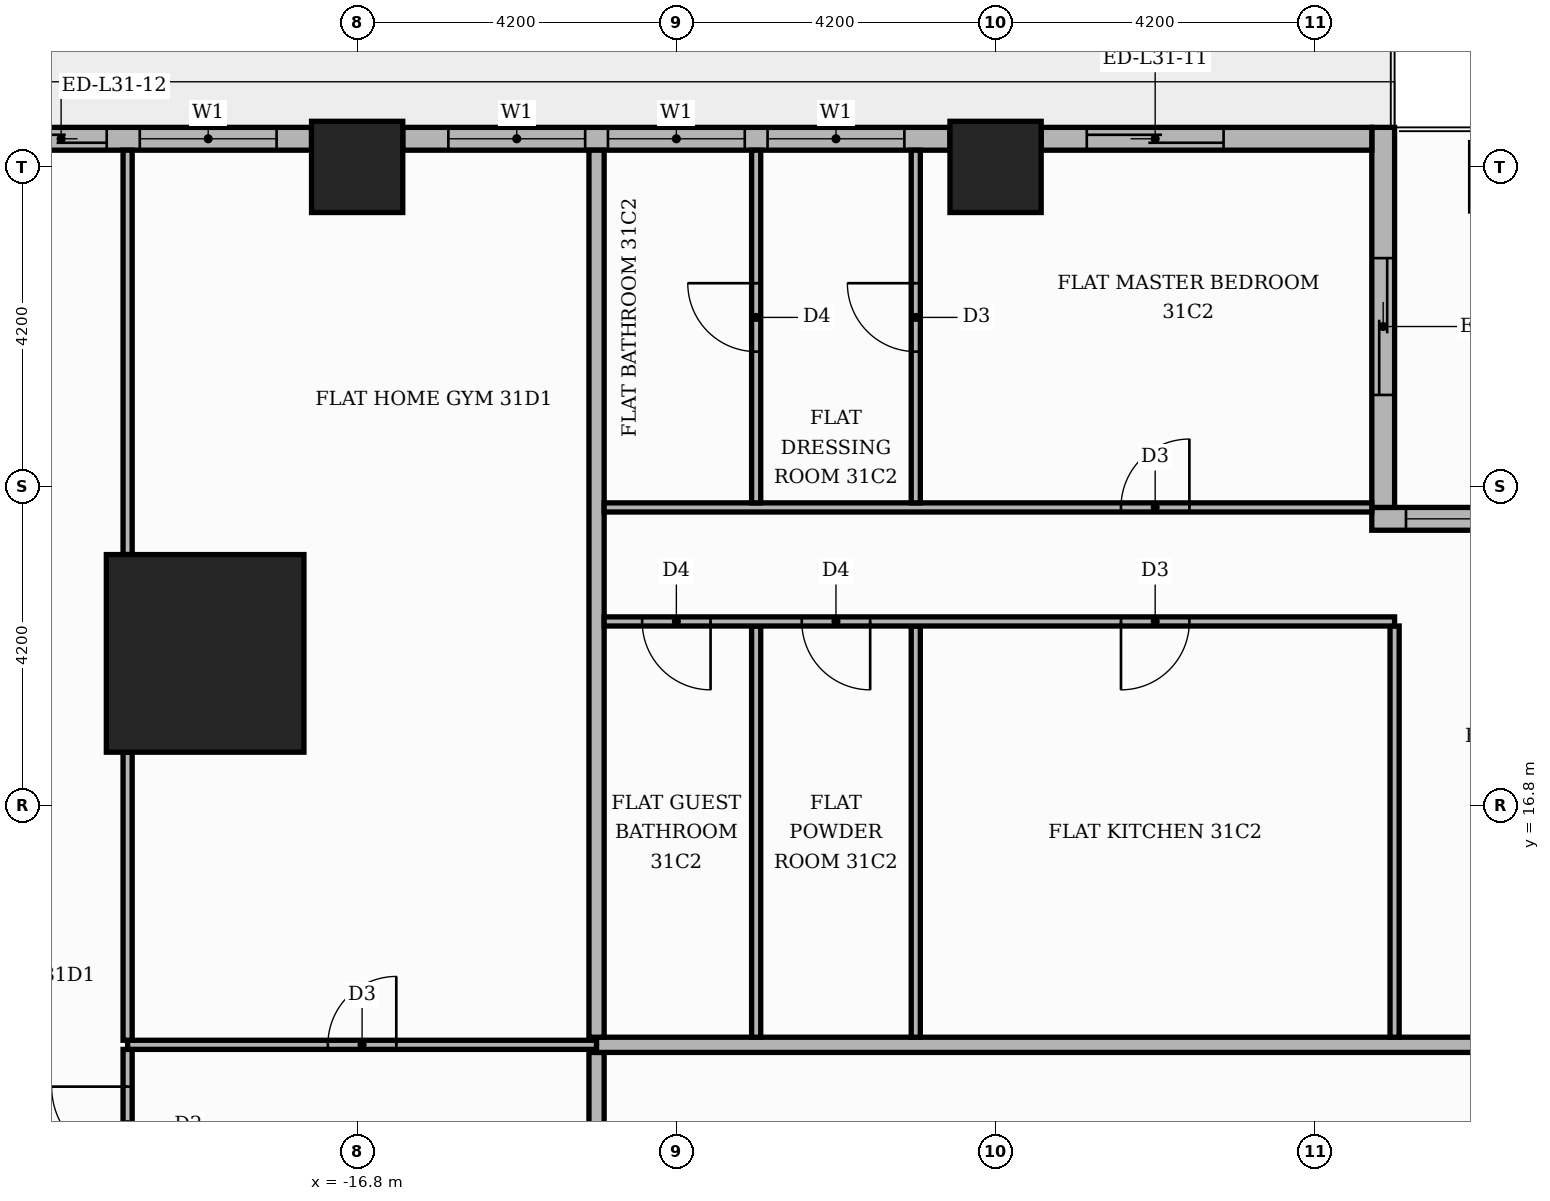
"""IFC4 building model, lengths in metres.
Left out: names, types, materials, properties, quantities, classifications, styles, units other than length and angle.
Written with IfcOpenShell. Run it as: python <this file> out.ifc"""

import sys

from ifc_helpers import new_model, si_unit, direction, frame, frame_2d, origin, origin_2d, place, context, subcontext, project, spatial, rectangle, extrude, element, fill, save


model = new_model("IFC4")
c1 = context("Model", 3, precision=1e-05, world=origin(), true_north=direction((0.0, 1.0)))
c2 = subcontext(c1, "Body", "Model", "MODEL_VIEW")
j1 = project(units=[si_unit("LENGTHUNIT", "METRE"), si_unit("PLANEANGLEUNIT", "RADIAN")], contexts=[c1])
p1 = place(None, origin())
s1 = spatial("IfcSite", under=j1, at=p1, CompositionType="ELEMENT")
p2 = place(p1, origin())
s2 = spatial("IfcBuilding", under=s1, at=p2, CompositionType="ELEMENT")
p3 = place(p2, frame((0.0, 0.0, 133.8)))
s3 = spatial("IfcBuildingStorey", under=s2, at=p3, CompositionType="ELEMENT", Elevation=133.8)
p4 = place(p3, frame((-18.8, 18.8, 0.0), z_axis=(0.0, 0.0, 1.0), x_axis=(1.0, 0.0, 0.0)))
e1 = element("IfcColumn", 1, at=p4, inside=s3, PredefinedType="COLUMN", context=c2, shape_type="SweptSolid", body=[
    extrude(rectangle(XDim=2.6, YDim=2.6, at=origin_2d()), origin(), (0.0, 0.0, 1.0), 3.9),
])
for number, where, z_axis, x_axis in (
    (2, (-8.4, 25.2, 0.0), (0.0, 0.0, 1.0), (1.0, 0.0, 0.0)),
    (3, (-16.8, 25.2, 0.0), (0.0, 0.0, 1.0), (1.0, 0.0, 0.0)),
):
    element("IfcColumn", number, at=place(p3, frame(where, z_axis=z_axis, x_axis=x_axis)), inside=s3, PredefinedType="COLUMN", context=c2, shape_type="SweptSolid", body=[
        extrude(rectangle(XDim=1.2, YDim=1.2, at=origin_2d()), origin(), (0.0, 0.0, 1.0), 3.9),
    ])
p5 = place(p3, frame((3.15, 20.57, 0.0), z_axis=(0.0, 0.0, 1.0), x_axis=(-1.0, 0.0, 0.0)))
e4 = element("IfcWall", 4, at=p5, inside=s3, PredefinedType="STANDARD", context=c2, shape_type="SweptSolid", body=[
    extrude(rectangle(XDim=6.6, YDim=0.3, at=frame_2d((3.3, 0.0))), origin(), (0.0, 0.0, 1.0), 3.48),
])
p6 = place(p5, frame((0.15, 0.0, 0.9)))
e5 = element("IfcOpeningElement", 5, at=p6, cuts=e4, PredefinedType="OPENING", context=c2, shape_type="SweptSolid", body=[
    extrude(rectangle(XDim=6.0, YDim=2.1, at=frame_2d((3.0, 1.05))), frame((0.0, 0.16, 0.0), z_axis=(0.0, -1.0, 0.0), x_axis=(1.0, 0.0, 0.0)), (0.0, 0.0, 1.0), 0.32),
])
p7 = place(p3, frame((-3.3, 20.72, 0.0), z_axis=(0.0, 0.0, 1.0), x_axis=(0.0, 1.0, 0.0)))
e6 = element("IfcWall", 6, at=p7, inside=s3, PredefinedType="STANDARD", context=c2, shape_type="SweptSolid", body=[
    extrude(rectangle(XDim=5.0, YDim=0.3, at=frame_2d((2.5, 0.0))), origin(), (0.0, 0.0, 1.0), 3.48),
])
p8 = place(p7, frame((1.48, 0.0, 0.0)))
e7 = element("IfcOpeningElement", 7, at=p8, cuts=e6, PredefinedType="OPENING", context=c2, shape_type="SweptSolid", body=[
    extrude(rectangle(XDim=1.8, YDim=2.4, at=frame_2d((0.9, 1.2))), frame((0.0, 0.16, 0.0), z_axis=(0.0, -1.0, 0.0), x_axis=(1.0, 0.0, 0.0)), (0.0, 0.0, 1.0), 0.32),
])
p9 = place(p3, frame((-3.45, 25.57, 0.0), z_axis=(0.0, 0.0, 1.0), x_axis=(-1.0, 0.0, 0.0)))
e8 = element("IfcWall", 8, at=p9, inside=s3, PredefinedType="STANDARD", context=c2, shape_type="SweptSolid", body=[
    extrude(rectangle(XDim=4.35, YDim=0.3, at=frame_2d((2.175, 0.0))), origin(), (0.0, 0.0, 1.0), 3.48),
])
p10 = place(p9, frame((1.95, 0.0, 0.0)))
e9 = element("IfcOpeningElement", 9, at=p10, cuts=e8, PredefinedType="OPENING", context=c2, shape_type="SweptSolid", body=[
    extrude(rectangle(XDim=1.8, YDim=2.4, at=frame_2d((0.9, 1.2))), frame((0.0, 0.16, 0.0), z_axis=(0.0, -1.0, 0.0), x_axis=(1.0, 0.0, 0.0)), (0.0, 0.0, 1.0), 0.32),
])
p11 = place(p3, frame((-9.0, 25.57, 0.0), z_axis=(0.0, 0.0, 1.0), x_axis=(-1.0, 0.0, 0.0)))
e10 = element("IfcWall", 10, at=p11, inside=s3, PredefinedType="STANDARD", context=c2, shape_type="SweptSolid", body=[
    extrude(rectangle(XDim=7.2, YDim=0.3, at=frame_2d((3.6, 0.0))), origin(), (0.0, 0.0, 1.0), 3.48),
])
p12 = place(p11, frame((0.6, 0.0, 0.9)))
e11 = element("IfcOpeningElement", 11, at=p12, cuts=e10, PredefinedType="OPENING", context=c2, shape_type="SweptSolid", body=[
    extrude(rectangle(XDim=1.8, YDim=2.1, at=frame_2d((0.9, 1.05))), frame((0.0, 0.16, 0.0), z_axis=(0.0, -1.0, 0.0), x_axis=(1.0, 0.0, 0.0)), (0.0, 0.0, 1.0), 0.32),
])
p13 = place(p11, frame((2.7, 0.0, 0.9)))
e12 = element("IfcOpeningElement", 12, at=p13, cuts=e10, PredefinedType="OPENING", context=c2, shape_type="SweptSolid", body=[
    extrude(rectangle(XDim=1.8, YDim=2.1, at=frame_2d((0.9, 1.05))), frame((0.0, 0.16, 0.0), z_axis=(0.0, -1.0, 0.0), x_axis=(1.0, 0.0, 0.0)), (0.0, 0.0, 1.0), 0.32),
])
p14 = place(p11, frame((4.8, 0.0, 0.9)))
e13 = element("IfcOpeningElement", 13, at=p14, cuts=e10, PredefinedType="OPENING", context=c2, shape_type="SweptSolid", body=[
    extrude(rectangle(XDim=1.8, YDim=2.1, at=frame_2d((0.9, 1.05))), frame((0.0, 0.16, 0.0), z_axis=(0.0, -1.0, 0.0), x_axis=(1.0, 0.0, 0.0)), (0.0, 0.0, 1.0), 0.32),
])
p15 = place(p3, frame((-17.4, 25.57, 0.0), z_axis=(0.0, 0.0, 1.0), x_axis=(-1.0, 0.0, 0.0)))
e14 = element("IfcWall", 14, at=p15, inside=s3, PredefinedType="STANDARD", context=c2, shape_type="SweptSolid", body=[
    extrude(rectangle(XDim=4.32, YDim=0.3, at=frame_2d((2.16, 0.0))), origin(), (0.0, 0.0, 1.0), 3.48),
])
p16 = place(p15, frame((2.695, 0.0, 0.0)))
e15 = element("IfcOpeningElement", 15, at=p16, cuts=e14, PredefinedType="OPENING", context=c2, shape_type="SweptSolid", body=[
    extrude(rectangle(XDim=1.2, YDim=2.4, at=frame_2d((0.6, 1.2))), frame((0.0, 0.16, 0.0), z_axis=(0.0, -1.0, 0.0), x_axis=(1.0, 0.0, 0.0)), (0.0, 0.0, 1.0), 0.32),
])
p17 = place(p15, frame((0.46, 0.0, 0.9)))
e16 = element("IfcOpeningElement", 16, at=p17, cuts=e14, PredefinedType="OPENING", context=c2, shape_type="SweptSolid", body=[
    extrude(rectangle(XDim=1.8, YDim=2.1, at=frame_2d((0.9, 1.05))), frame((0.0, 0.16, 0.0), z_axis=(0.0, -1.0, 0.0), x_axis=(1.0, 0.0, 0.0)), (0.0, 0.0, 1.0), 0.32),
])
p18 = place(p3, frame((-13.65, 11.1, 0.0), z_axis=(0.0, 0.0, 1.0), x_axis=(0.0, 1.0, 0.0)))
e17 = element("IfcWall", 17, at=p18, inside=s3, PredefinedType="PARTITIONING", context=c2, shape_type="SweptSolid", body=[
    extrude(rectangle(XDim=2.45, YDim=0.2, at=frame_2d((1.225, 0.0))), origin(), (0.0, 0.0, 1.0), 3.48),
])
p19 = place(p3, frame((-19.82, 11.61, 0.0), z_axis=(0.0, 0.0, 1.0), x_axis=(0.0, 1.0, 0.0)))
e18 = element("IfcWall", 18, at=p19, inside=s3, PredefinedType="PARTITIONING", context=c2, shape_type="SweptSolid", body=[
    extrude(rectangle(XDim=1.98, YDim=0.12, at=frame_2d((0.99, 0.0))), origin(), (0.0, 0.0, 1.0), 3.48),
])
p20 = place(p19, frame((0.49, 0.0, 0.0)))
e19 = element("IfcOpeningElement", 19, at=p20, cuts=e18, PredefinedType="OPENING", context=c2, shape_type="SweptSolid", body=[
    extrude(rectangle(XDim=1.0, YDim=2.1, at=frame_2d((0.5, 1.05))), frame((0.0, 0.07, 0.0), z_axis=(0.0, -1.0, 0.0), x_axis=(1.0, 0.0, 0.0)), (0.0, 0.0, 1.0), 0.14),
])
p21 = place(p3, frame((-19.82, 13.65, 0.0), z_axis=(0.0, 0.0, 1.0), x_axis=(1.0, 0.0, 0.0)))
e20 = element("IfcWall", 20, at=p21, inside=s3, PredefinedType="PARTITIONING", context=c2, shape_type="SweptSolid", body=[
    extrude(rectangle(XDim=6.17, YDim=0.12, at=frame_2d((3.085, 0.0))), origin(), (0.0, 0.0, 1.0), 3.48),
])
p22 = place(p21, frame((2.635, 0.0, 0.0)))
e21 = element("IfcOpeningElement", 21, at=p22, cuts=e20, PredefinedType="OPENING", context=c2, shape_type="SweptSolid", body=[
    extrude(rectangle(XDim=0.9, YDim=2.1, at=frame_2d((0.45, 1.05))), frame((0.0, 0.07, 0.0), z_axis=(0.0, -1.0, 0.0), x_axis=(1.0, 0.0, 0.0)), (0.0, 0.0, 1.0), 0.14),
])
p23 = place(p3, frame((-13.65, 13.65, 0.0), z_axis=(0.0, 0.0, 1.0), x_axis=(1.0, 0.0, 0.0)))
e22 = element("IfcWall", 22, at=p23, inside=s3, PredefinedType="PARTITIONING", context=c2, shape_type="SweptSolid", body=[
    extrude(rectangle(XDim=39.07, YDim=0.2, at=frame_2d((19.535, 0.0))), origin(), (0.0, 0.0, 1.0), 3.48),
])
p24 = place(p23, frame((24.65, 0.0, 0.0)))
e23 = element("IfcOpeningElement", 23, at=p24, cuts=e22, PredefinedType="OPENING", context=c2, shape_type="SweptSolid", body=[
    extrude(rectangle(XDim=1.1, YDim=2.4, at=frame_2d((0.55, 1.2))), frame((0.0, 0.11, 0.0), z_axis=(0.0, -1.0, 0.0), x_axis=(1.0, 0.0, 0.0)), (0.0, 0.0, 1.0), 0.22),
])
p25 = place(p23, frame((12.05, 0.0, 0.0)))
e24 = element("IfcOpeningElement", 24, at=p25, cuts=e22, PredefinedType="OPENING", context=c2, shape_type="SweptSolid", body=[
    extrude(rectangle(XDim=1.1, YDim=2.4, at=frame_2d((0.55, 1.2))), frame((0.0, 0.11, 0.0), z_axis=(0.0, -1.0, 0.0), x_axis=(1.0, 0.0, 0.0)), (0.0, 0.0, 1.0), 0.22),
])
p26 = place(p3, frame((-19.82, 13.71, 0.0), z_axis=(0.0, 0.0, 1.0), x_axis=(0.0, 1.0, 0.0)))
e25 = element("IfcWall", 25, at=p26, inside=s3, PredefinedType="PARTITIONING", context=c2, shape_type="SweptSolid", body=[
    extrude(rectangle(XDim=3.79, YDim=0.12, at=frame_2d((1.895, 0.0))), origin(), (0.0, 0.0, 1.0), 3.48),
])
p27 = place(p3, frame((-13.65, 13.75, 0.0), z_axis=(0.0, 0.0, 1.0), x_axis=(0.0, 1.0, 0.0)))
e26 = element("IfcWall", 26, at=p27, inside=s3, PredefinedType="PARTITIONING", context=c2, shape_type="SweptSolid", body=[
    extrude(rectangle(XDim=11.67, YDim=0.2, at=frame_2d((5.835, 0.0))), origin(), (0.0, 0.0, 1.0), 3.48),
])
for number, where, z_axis, x_axis in (
    (27, (-11.55, 13.75, 0.0), (0.0, 0.0, 1.0), (0.0, 1.0, 0.0)),
    (28, (-9.45, 13.75, 0.0), (0.0, 0.0, 1.0), (0.0, 1.0, 0.0)),
    (29, (-3.15, 13.75, 0.0), (0.0, 0.0, 1.0), (0.0, 1.0, 0.0)),
):
    element("IfcWall", number, at=place(p3, frame(where, z_axis=z_axis, x_axis=x_axis)), inside=s3, PredefinedType="PARTITIONING", context=c2, shape_type="SweptSolid", body=[
        extrude(rectangle(XDim=5.41, YDim=0.12, at=frame_2d((2.705, 0.0))), origin(), (0.0, 0.0, 1.0), 3.48),
    ])
p28 = place(p3, frame((-13.55, 19.22, 0.0), z_axis=(0.0, 0.0, 1.0), x_axis=(1.0, 0.0, 0.0)))
e30 = element("IfcWall", 30, at=p28, inside=s3, PredefinedType="PARTITIONING", context=c2, shape_type="SweptSolid", body=[
    extrude(rectangle(XDim=10.4, YDim=0.12, at=frame_2d((5.2, 0.0))), origin(), (0.0, 0.0, 1.0), 3.48),
])
p29 = place(p28, frame((6.8, 0.0, 0.0)))
e31 = element("IfcOpeningElement", 31, at=p29, cuts=e30, PredefinedType="OPENING", context=c2, shape_type="SweptSolid", body=[
    extrude(rectangle(XDim=0.9, YDim=2.1, at=frame_2d((0.45, 1.05))), frame((0.0, 0.07, 0.0), z_axis=(0.0, -1.0, 0.0), x_axis=(1.0, 0.0, 0.0)), (0.0, 0.0, 1.0), 0.14),
])
p30 = place(p28, frame((2.6, 0.0, 0.0)))
e32 = element("IfcOpeningElement", 32, at=p30, cuts=e30, PredefinedType="OPENING", context=c2, shape_type="SweptSolid", body=[
    extrude(rectangle(XDim=0.9, YDim=2.1, at=frame_2d((0.45, 1.05))), frame((0.0, 0.07, 0.0), z_axis=(0.0, -1.0, 0.0), x_axis=(1.0, 0.0, 0.0)), (0.0, 0.0, 1.0), 0.14),
])
p31 = place(p28, frame((0.5, 0.0, 0.0)))
e33 = element("IfcOpeningElement", 33, at=p31, cuts=e30, PredefinedType="OPENING", context=c2, shape_type="SweptSolid", body=[
    extrude(rectangle(XDim=0.9, YDim=2.1, at=frame_2d((0.45, 1.05))), frame((0.0, 0.07, 0.0), z_axis=(0.0, -1.0, 0.0), x_axis=(1.0, 0.0, 0.0)), (0.0, 0.0, 1.0), 0.14),
])
p32 = place(p3, frame((-19.82, 20.1, 0.0), z_axis=(0.0, 0.0, 1.0), x_axis=(0.0, 1.0, 0.0)))
e34 = element("IfcWall", 34, at=p32, inside=s3, PredefinedType="PARTITIONING", context=c2, shape_type="SweptSolid", body=[
    extrude(rectangle(XDim=5.32, YDim=0.12, at=frame_2d((2.66, 0.0))), origin(), (0.0, 0.0, 1.0), 3.48),
])
p33 = place(p3, frame((-13.55, 20.72, 0.0), z_axis=(0.0, 0.0, 1.0), x_axis=(1.0, 0.0, 0.0)))
e35 = element("IfcWall", 35, at=p33, inside=s3, PredefinedType="PARTITIONING", context=c2, shape_type="SweptSolid", body=[
    extrude(rectangle(XDim=10.1, YDim=0.12, at=frame_2d((5.05, 0.0))), origin(), (0.0, 0.0, 1.0), 3.48),
])
p34 = place(p33, frame((6.8, 0.0, 0.0)))
e36 = element("IfcOpeningElement", 36, at=p34, cuts=e35, PredefinedType="OPENING", context=c2, shape_type="SweptSolid", body=[
    extrude(rectangle(XDim=0.9, YDim=2.1, at=frame_2d((0.45, 1.05))), frame((0.0, 0.07, 0.0), z_axis=(0.0, -1.0, 0.0), x_axis=(1.0, 0.0, 0.0)), (0.0, 0.0, 1.0), 0.14),
])
p35 = place(p3, frame((-11.55, 20.78, 0.0), z_axis=(0.0, 0.0, 1.0), x_axis=(0.0, 1.0, 0.0)))
e37 = element("IfcWall", 37, at=p35, inside=s3, PredefinedType="PARTITIONING", context=c2, shape_type="SweptSolid", body=[
    extrude(rectangle(XDim=4.64, YDim=0.12, at=frame_2d((2.32, 0.0))), origin(), (0.0, 0.0, 1.0), 3.48),
])
p36 = place(p35, frame((1.99, 0.0, 0.0)))
e38 = element("IfcOpeningElement", 38, at=p36, cuts=e37, PredefinedType="OPENING", context=c2, shape_type="SweptSolid", body=[
    extrude(rectangle(XDim=0.9, YDim=2.1, at=frame_2d((0.45, 1.05))), frame((0.0, 0.07, 0.0), z_axis=(0.0, -1.0, 0.0), x_axis=(1.0, 0.0, 0.0)), (0.0, 0.0, 1.0), 0.14),
])
p37 = place(p3, frame((-9.45, 20.78, 0.0), z_axis=(0.0, 0.0, 1.0), x_axis=(0.0, 1.0, 0.0)))
e39 = element("IfcWall", 39, at=p37, inside=s3, PredefinedType="PARTITIONING", context=c2, shape_type="SweptSolid", body=[
    extrude(rectangle(XDim=4.64, YDim=0.12, at=frame_2d((2.32, 0.0))), origin(), (0.0, 0.0, 1.0), 3.48),
])
p38 = place(p37, frame((1.99, 0.0, 0.0)))
e40 = element("IfcOpeningElement", 40, at=p38, cuts=e39, PredefinedType="OPENING", context=c2, shape_type="SweptSolid", body=[
    extrude(rectangle(XDim=0.9, YDim=2.1, at=frame_2d((0.45, 1.05))), frame((0.0, 0.07, 0.0), z_axis=(0.0, -1.0, 0.0), x_axis=(1.0, 0.0, 0.0)), (0.0, 0.0, 1.0), 0.14),
])
p39 = place(p6, origin())
e41 = element("IfcWindow", 41, at=p39, inside=s3, PartitioningType="SINGLE_PANEL", PredefinedType="WINDOW", context=c2, shape_type="SweptSolid", body=[
    extrude(rectangle(XDim=6.0, YDim=2.1, at=frame_2d((3.0, 1.05))), frame((0.0, 0.03, 0.0), z_axis=(0.0, -1.0, 0.0), x_axis=(1.0, 0.0, 0.0)), (0.0, 0.0, 1.0), 0.06),
])
fill(e5, e41)
p40 = place(p8, origin())
e42 = element("IfcDoor", 42, at=p40, inside=s3, OperationType="SLIDING_TO_RIGHT", PredefinedType="DOOR", context=c2, shape_type="SweptSolid", body=[
    extrude(rectangle(XDim=1.8, YDim=2.4, at=frame_2d((0.9, 1.2))), frame((0.0, 0.025, 0.0), z_axis=(0.0, -1.0, 0.0), x_axis=(1.0, 0.0, 0.0)), (0.0, 0.0, 1.0), 0.05),
])
fill(e7, e42)
p41 = place(p10, origin())
e43 = element("IfcDoor", 43, at=p41, inside=s3, OperationType="SLIDING_TO_RIGHT", PredefinedType="DOOR", context=c2, shape_type="SweptSolid", body=[
    extrude(rectangle(XDim=1.8, YDim=2.4, at=frame_2d((0.9, 1.2))), frame((0.0, 0.025, 0.0), z_axis=(0.0, -1.0, 0.0), x_axis=(1.0, 0.0, 0.0)), (0.0, 0.0, 1.0), 0.05),
])
fill(e9, e43)
p42 = place(p12, origin())
e44 = element("IfcWindow", 44, at=p42, inside=s3, PartitioningType="SINGLE_PANEL", PredefinedType="WINDOW", context=c2, shape_type="SweptSolid", body=[
    extrude(rectangle(XDim=1.8, YDim=2.1, at=frame_2d((0.9, 1.05))), frame((0.0, 0.03, 0.0), z_axis=(0.0, -1.0, 0.0), x_axis=(1.0, 0.0, 0.0)), (0.0, 0.0, 1.0), 0.06),
])
fill(e11, e44)
p43 = place(p13, origin())
e45 = element("IfcWindow", 45, at=p43, inside=s3, PartitioningType="SINGLE_PANEL", PredefinedType="WINDOW", context=c2, shape_type="SweptSolid", body=[
    extrude(rectangle(XDim=1.8, YDim=2.1, at=frame_2d((0.9, 1.05))), frame((0.0, 0.03, 0.0), z_axis=(0.0, -1.0, 0.0), x_axis=(1.0, 0.0, 0.0)), (0.0, 0.0, 1.0), 0.06),
])
fill(e12, e45)
p44 = place(p14, origin())
e46 = element("IfcWindow", 46, at=p44, inside=s3, PartitioningType="SINGLE_PANEL", PredefinedType="WINDOW", context=c2, shape_type="SweptSolid", body=[
    extrude(rectangle(XDim=1.8, YDim=2.1, at=frame_2d((0.9, 1.05))), frame((0.0, 0.03, 0.0), z_axis=(0.0, -1.0, 0.0), x_axis=(1.0, 0.0, 0.0)), (0.0, 0.0, 1.0), 0.06),
])
fill(e13, e46)
p45 = place(p16, origin())
e47 = element("IfcDoor", 47, at=p45, inside=s3, OperationType="SLIDING_TO_LEFT", PredefinedType="DOOR", context=c2, shape_type="SweptSolid", body=[
    extrude(rectangle(XDim=1.2, YDim=2.4, at=frame_2d((0.6, 1.2))), frame((0.0, 0.025, 0.0), z_axis=(0.0, -1.0, 0.0), x_axis=(1.0, 0.0, 0.0)), (0.0, 0.0, 1.0), 0.05),
])
fill(e15, e47)
p46 = place(p17, origin())
e48 = element("IfcWindow", 48, at=p46, inside=s3, PartitioningType="SINGLE_PANEL", PredefinedType="WINDOW", context=c2, shape_type="SweptSolid", body=[
    extrude(rectangle(XDim=1.8, YDim=2.1, at=frame_2d((0.9, 1.05))), frame((0.0, 0.03, 0.0), z_axis=(0.0, -1.0, 0.0), x_axis=(1.0, 0.0, 0.0)), (0.0, 0.0, 1.0), 0.06),
])
fill(e16, e48)
p47 = place(p29, frame((0.9, 0.0, 0.0), z_axis=(0.0, 0.0, 1.0), x_axis=(-1.0, 0.0, 0.0)))
e49 = element("IfcDoor", 49, at=p47, inside=s3, OperationType="SINGLE_SWING_LEFT", PredefinedType="DOOR", context=c2, shape_type="SweptSolid", body=[
    extrude(rectangle(XDim=0.9, YDim=2.1, at=frame_2d((0.45, 1.05))), frame((0.0, 0.025, 0.0), z_axis=(0.0, -1.0, 0.0), x_axis=(1.0, 0.0, 0.0)), (0.0, 0.0, 1.0), 0.05),
])
fill(e31, e49)
p48 = place(p30, frame((0.9, 0.0, 0.0), z_axis=(0.0, 0.0, 1.0), x_axis=(-1.0, 0.0, 0.0)))
e50 = element("IfcDoor", 50, at=p48, inside=s3, OperationType="SINGLE_SWING_RIGHT", PredefinedType="DOOR", context=c2, shape_type="SweptSolid", body=[
    extrude(rectangle(XDim=0.9, YDim=2.1, at=frame_2d((0.45, 1.05))), frame((0.0, 0.025, 0.0), z_axis=(0.0, -1.0, 0.0), x_axis=(1.0, 0.0, 0.0)), (0.0, 0.0, 1.0), 0.05),
])
fill(e32, e50)
p49 = place(p31, frame((0.9, 0.0, 0.0), z_axis=(0.0, 0.0, 1.0), x_axis=(-1.0, 0.0, 0.0)))
e51 = element("IfcDoor", 51, at=p49, inside=s3, OperationType="SINGLE_SWING_RIGHT", PredefinedType="DOOR", context=c2, shape_type="SweptSolid", body=[
    extrude(rectangle(XDim=0.9, YDim=2.1, at=frame_2d((0.45, 1.05))), frame((0.0, 0.025, 0.0), z_axis=(0.0, -1.0, 0.0), x_axis=(1.0, 0.0, 0.0)), (0.0, 0.0, 1.0), 0.05),
])
fill(e33, e51)
p50 = place(p34, origin())
e52 = element("IfcDoor", 52, at=p50, inside=s3, OperationType="SINGLE_SWING_RIGHT", PredefinedType="DOOR", context=c2, shape_type="SweptSolid", body=[
    extrude(rectangle(XDim=0.9, YDim=2.1, at=frame_2d((0.45, 1.05))), frame((0.0, 0.025, 0.0), z_axis=(0.0, -1.0, 0.0), x_axis=(1.0, 0.0, 0.0)), (0.0, 0.0, 1.0), 0.05),
])
fill(e36, e52)
p51 = place(p38, origin())
e53 = element("IfcDoor", 53, at=p51, inside=s3, OperationType="SINGLE_SWING_RIGHT", PredefinedType="DOOR", context=c2, shape_type="SweptSolid", body=[
    extrude(rectangle(XDim=0.9, YDim=2.1, at=frame_2d((0.45, 1.05))), frame((0.0, 0.025, 0.0), z_axis=(0.0, -1.0, 0.0), x_axis=(1.0, 0.0, 0.0)), (0.0, 0.0, 1.0), 0.05),
])
fill(e40, e53)
p52 = place(p36, origin())
e54 = element("IfcDoor", 54, at=p52, inside=s3, OperationType="SINGLE_SWING_RIGHT", PredefinedType="DOOR", context=c2, shape_type="SweptSolid", body=[
    extrude(rectangle(XDim=0.9, YDim=2.1, at=frame_2d((0.45, 1.05))), frame((0.0, 0.025, 0.0), z_axis=(0.0, -1.0, 0.0), x_axis=(1.0, 0.0, 0.0)), (0.0, 0.0, 1.0), 0.05),
])
fill(e38, e54)
p53 = place(p22, origin())
e55 = element("IfcDoor", 55, at=p53, inside=s3, OperationType="SINGLE_SWING_RIGHT", PredefinedType="DOOR", context=c2, shape_type="SweptSolid", body=[
    extrude(rectangle(XDim=0.9, YDim=2.1, at=frame_2d((0.45, 1.05))), frame((0.0, 0.025, 0.0), z_axis=(0.0, -1.0, 0.0), x_axis=(1.0, 0.0, 0.0)), (0.0, 0.0, 1.0), 0.05),
])
fill(e21, e55)
p54 = place(p20, origin())
e56 = element("IfcDoor", 56, at=p54, inside=s3, OperationType="SINGLE_SWING_RIGHT", PredefinedType="DOOR", context=c2, shape_type="SweptSolid", body=[
    extrude(rectangle(XDim=1.0, YDim=2.1, at=frame_2d((0.5, 1.05))), frame((0.0, 0.025, 0.0), z_axis=(0.0, -1.0, 0.0), x_axis=(1.0, 0.0, 0.0)), (0.0, 0.0, 1.0), 0.05),
])
fill(e19, e56)
save(model, sys.argv[1])
